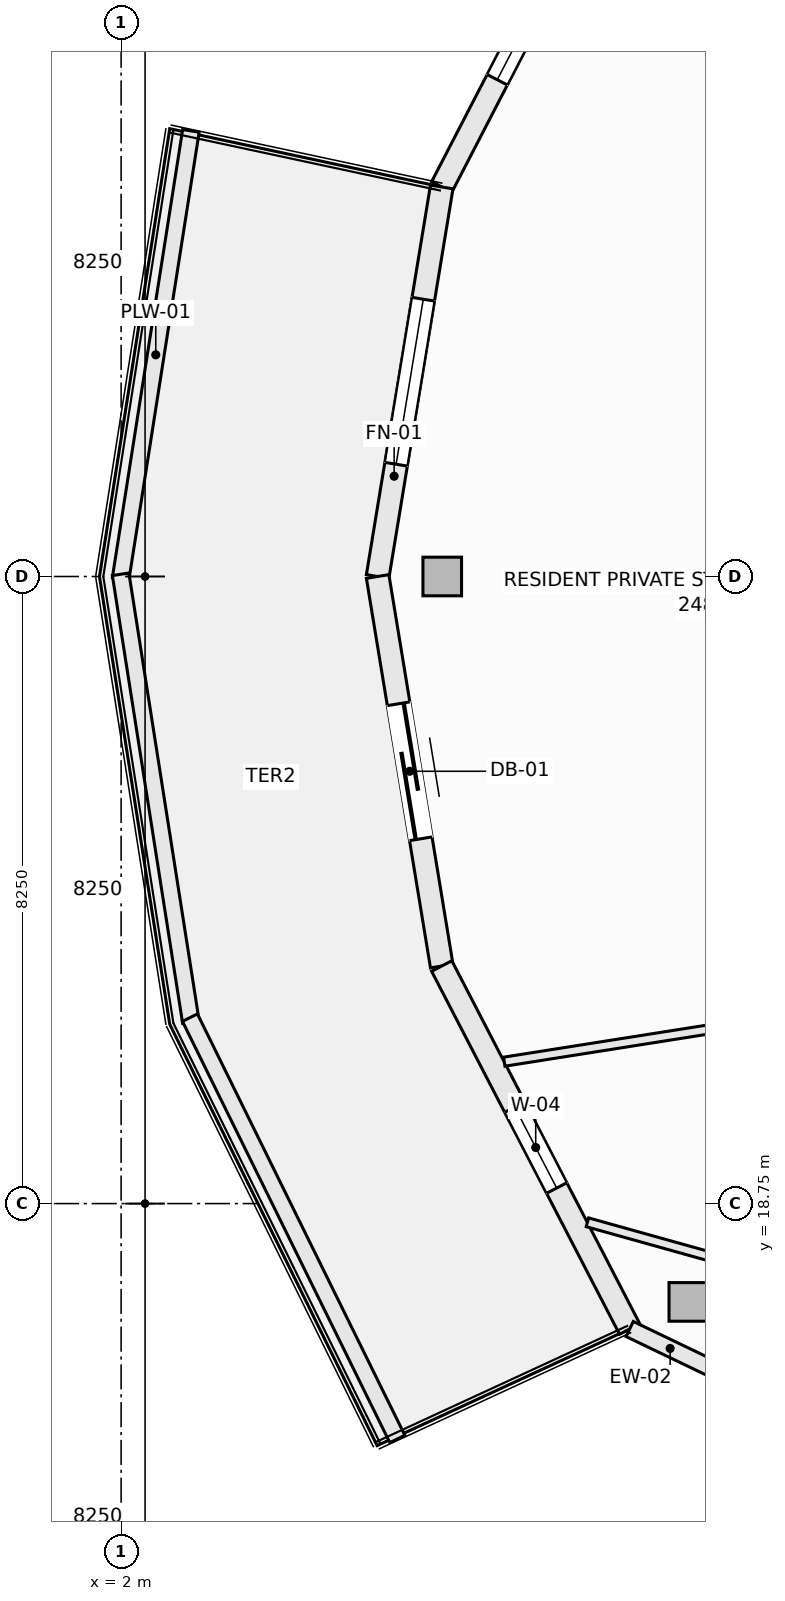
"""IFC4 building model, lengths in metres.
Left out: names, types, materials, properties, quantities, classifications, styles, units other than length and angle.
Written with IfcOpenShell. Run it as: python <this file> out.ifc"""

import sys

from ifc_helpers import new_model, si_unit, direction, frame, frame_2d, origin, origin_2d, place, context, subcontext, project, spatial, rectangle, hollow_rectangle, extrude, element, fill, save


model = new_model("IFC4")
c1 = context("Model", 3, precision=1e-05, world=origin(), true_north=direction((0.0, 1.0)))
c2 = subcontext(c1, "Body", "Model", "MODEL_VIEW")
j1 = project(units=[si_unit("LENGTHUNIT", "METRE"), si_unit("PLANEANGLEUNIT", "RADIAN")], contexts=[c1])
p1 = place(None, origin())
s1 = spatial("IfcSite", under=j1, at=p1, CompositionType="ELEMENT")
p2 = place(p1, origin())
s2 = spatial("IfcBuilding", under=s1, at=p2, CompositionType="ELEMENT")
p3 = place(p2, frame((0.0, 0.0, 219.5)))
s3 = spatial("IfcBuildingStorey", under=s2, at=p3, CompositionType="ELEMENT", Elevation=219.5)
for number, where, z_axis, x_axis in (
    (1, (6.225, 27.0, -0.27), (0.0, 0.0, 1.0), (1.0, 0.0, 0.0)),
    (2, (9.463, 17.456, -0.27), (0.0, 0.0, 1.0), (1.0, 0.0, 0.0)),
):
    element("IfcColumn", number, at=place(p3, frame(where, z_axis=z_axis, x_axis=x_axis)), inside=s3, PredefinedType="COLUMN", context=c2, shape_type="SweptSolid", body=[
        extrude(hollow_rectangle(XDim=0.508, YDim=0.508, WallThickness=0.019, at=origin_2d()), origin(), (0.0, 0.0, 1.0), 3.3),
    ])
p4 = place(p3, frame((6.218, 32.125, 0.0), z_axis=(0.0, 0.0, 1.0), x_axis=(0.459808219482, 0.888018243786, 0.0)))
e3 = element("IfcWall", 3, at=p4, inside=s3, PredefinedType="SOLIDWALL", context=c2, shape_type="SweptSolid", body=[
    extrude(rectangle(XDim=5.378, YDim=0.3, at=frame_2d((2.689, 0.0))), origin(), (0.0, 0.0, 1.0), 2.605),
])
p5 = place(p4, frame((1.589, 0.0, 0.72)))
e4 = element("IfcOpeningElement", 4, at=p5, cuts=e3, PredefinedType="OPENING", context=c2, shape_type="SweptSolid", body=[
    extrude(rectangle(XDim=2.2, YDim=1.65, at=frame_2d((1.1, 0.825))), frame((0.0, 0.16, 0.0), z_axis=(0.0, -1.0, 0.0), x_axis=(1.0, 0.0, 0.0)), (0.0, 0.0, 1.0), 0.32),
])
p6 = place(p3, frame((5.375, 27.0, 0.0), z_axis=(0.0, 0.0, 1.0), x_axis=(0.16237087798, 0.986729799886, 0.0)))
e5 = element("IfcWall", 5, at=p6, inside=s3, PredefinedType="SOLIDWALL", context=c2, shape_type="SweptSolid", body=[
    extrude(rectangle(XDim=5.193, YDim=0.3, at=frame_2d((2.597, 0.0))), origin(), (0.0, 0.0, 1.0), 2.605),
])
p7 = place(p6, frame((1.497, 0.0, 0.72)))
e6 = element("IfcOpeningElement", 6, at=p7, cuts=e5, PredefinedType="OPENING", context=c2, shape_type="SweptSolid", body=[
    extrude(rectangle(XDim=2.2, YDim=1.65, at=frame_2d((1.1, 0.825))), frame((0.0, 0.16, 0.0), z_axis=(0.0, -1.0, 0.0), x_axis=(1.0, 0.0, 0.0)), (0.0, 0.0, 1.0), 0.32),
])
p8 = place(p3, frame((5.375, 27.0, 0.0), z_axis=(0.0, 0.0, 1.0), x_axis=(0.16237087798, -0.986729799886, 0.0)))
e7 = element("IfcWall", 7, at=p8, inside=s3, PredefinedType="SOLIDWALL", context=c2, shape_type="SweptSolid", body=[
    extrude(rectangle(XDim=5.193, YDim=0.3, at=frame_2d((2.597, 0.0))), origin(), (0.0, 0.0, 1.0), 2.605),
])
p9 = place(p8, frame((1.697, 0.0, 0.0)))
e8 = element("IfcOpeningElement", 8, at=p9, cuts=e7, PredefinedType="OPENING", context=c2, shape_type="SweptSolid", body=[
    extrude(rectangle(XDim=1.8, YDim=2.25, at=frame_2d((0.9, 1.125))), frame((0.0, 0.16, 0.0), z_axis=(0.0, -1.0, 0.0), x_axis=(1.0, 0.0, 0.0)), (0.0, 0.0, 1.0), 0.32),
])
p10 = place(p3, frame((6.218, 21.875, 0.0), z_axis=(0.0, 0.0, 1.0), x_axis=(0.459808219482, -0.888018243786, 0.0)))
e9 = element("IfcWall", 9, at=p10, inside=s3, PredefinedType="SOLIDWALL", context=c2, shape_type="SweptSolid", body=[
    extrude(rectangle(XDim=5.378, YDim=0.3, at=frame_2d((2.689, 0.0))), origin(), (0.0, 0.0, 1.0), 2.605),
])
p11 = place(p10, frame((2.089, 0.0, 0.72)))
e10 = element("IfcOpeningElement", 10, at=p11, cuts=e9, PredefinedType="OPENING", context=c2, shape_type="SweptSolid", body=[
    extrude(rectangle(XDim=1.2, YDim=1.65, at=frame_2d((0.6, 0.825))), frame((0.0, 0.16, 0.0), z_axis=(0.0, -1.0, 0.0), x_axis=(1.0, 0.0, 0.0)), (0.0, 0.0, 1.0), 0.32),
])
p12 = place(p3, frame((8.691, 17.1, 0.0), z_axis=(0.0, 0.0, 1.0), x_axis=(0.901264843027, -0.433268603437, 0.0)))
e11 = element("IfcWall", 11, at=p12, inside=s3, PredefinedType="SOLIDWALL", context=c2, shape_type="SweptSolid", body=[
    extrude(rectangle(XDim=1.181, YDim=0.22, at=frame_2d((0.591, 0.0))), origin(), (0.0, 0.0, 1.0), 2.605),
])
for number, where, z_axis, x_axis in (
    (12, (1.993, 26.971, 0.0), (0.0, 0.0, 1.0), (0.155, 0.988, 0.0)),
    (13, (1.993, 27.029, 0.0), (0.0, 0.0, 1.0), (0.155, -0.988, 0.0)),
):
    element("IfcWall", number, at=place(p3, frame(where, z_axis=z_axis, x_axis=x_axis)), inside=s3, PredefinedType="PARAPET", context=c2, shape_type="SweptSolid", body=[
        extrude(rectangle(XDim=5.964, YDim=0.22, at=frame_2d((2.982, 0.0))), origin(), (0.0, 0.0, 1.0), 0.52),
    ])
p13 = place(p3, frame((2.906, 21.196, 0.0), z_axis=(0.0, 0.0, 1.0), x_axis=(0.441640961804, -0.897191875162, 0.0)))
e14 = element("IfcWall", 14, at=p13, inside=s3, PredefinedType="PARAPET", context=c2, shape_type="SweptSolid", body=[
    extrude(rectangle(XDim=6.178, YDim=0.22, at=frame_2d((3.089, 0.0))), origin(), (0.0, 0.0, 1.0), 0.52),
])
p14 = place(p3, frame((7.041, 20.617, 0.0), z_axis=(0.0, 0.0, 1.0), x_axis=(0.987780472541, 0.155851654036, 0.0)))
e15 = element("IfcWall", 15, at=p14, inside=s3, PredefinedType="PARTITIONING", context=c2, shape_type="SweptSolid", body=[
    extrude(rectangle(XDim=7.347, YDim=0.12, at=frame_2d((3.673, 0.0))), origin(), (0.0, 0.0, 1.0), 3.03),
])
p15 = place(p3, frame((8.135, 18.504, 0.0), z_axis=(0.0, 0.0, 1.0), x_axis=(0.963142154711, -0.268992917785, 0.0)))
e16 = element("IfcWall", 16, at=p15, inside=s3, PredefinedType="PARTITIONING", context=c2, shape_type="SweptSolid", body=[
    extrude(rectangle(XDim=19.662, YDim=0.12, at=frame_2d((9.831, 0.0))), origin(), (0.0, 0.0, 1.0), 2.77),
])
p16 = place(p5, origin())
e17 = element("IfcWindow", 17, at=p16, inside=s3, PartitioningType="SINGLE_PANEL", PredefinedType="WINDOW", context=c2, shape_type="SweptSolid", body=[
    extrude(rectangle(XDim=2.2, YDim=1.65, at=frame_2d((1.1, 0.825))), frame((0.0, 0.03, 0.0), z_axis=(0.0, -1.0, 0.0), x_axis=(1.0, 0.0, 0.0)), (0.0, 0.0, 1.0), 0.06),
])
fill(e4, e17)
p17 = place(p7, origin())
e18 = element("IfcWindow", 18, at=p17, inside=s3, PartitioningType="SINGLE_PANEL", PredefinedType="WINDOW", context=c2, shape_type="SweptSolid", body=[
    extrude(rectangle(XDim=2.2, YDim=1.65, at=frame_2d((1.1, 0.825))), frame((0.0, 0.03, 0.0), z_axis=(0.0, -1.0, 0.0), x_axis=(1.0, 0.0, 0.0)), (0.0, 0.0, 1.0), 0.06),
])
fill(e6, e18)
p18 = place(p9, frame((1.8, 0.0, 0.0), z_axis=(0.0, 0.0, 1.0), x_axis=(-1.0, 0.0, 0.0)))
e19 = element("IfcDoor", 19, at=p18, inside=s3, OperationType="SLIDING_TO_LEFT", PredefinedType="DOOR", context=c2, shape_type="SweptSolid", body=[
    extrude(rectangle(XDim=1.8, YDim=2.25, at=frame_2d((0.9, 1.125))), frame((0.0, 0.025, 0.0), z_axis=(0.0, -1.0, 0.0), x_axis=(1.0, 0.0, 0.0)), (0.0, 0.0, 1.0), 0.05),
])
fill(e8, e19)
p19 = place(p11, origin())
e20 = element("IfcWindow", 20, at=p19, inside=s3, PartitioningType="SINGLE_PANEL", PredefinedType="WINDOW", context=c2, shape_type="SweptSolid", body=[
    extrude(rectangle(XDim=1.2, YDim=1.65, at=frame_2d((0.6, 0.825))), frame((0.0, 0.03, 0.0), z_axis=(0.0, -1.0, 0.0), x_axis=(1.0, 0.0, 0.0)), (0.0, 0.0, 1.0), 0.06),
])
fill(e10, e20)
save(model, sys.argv[1])
